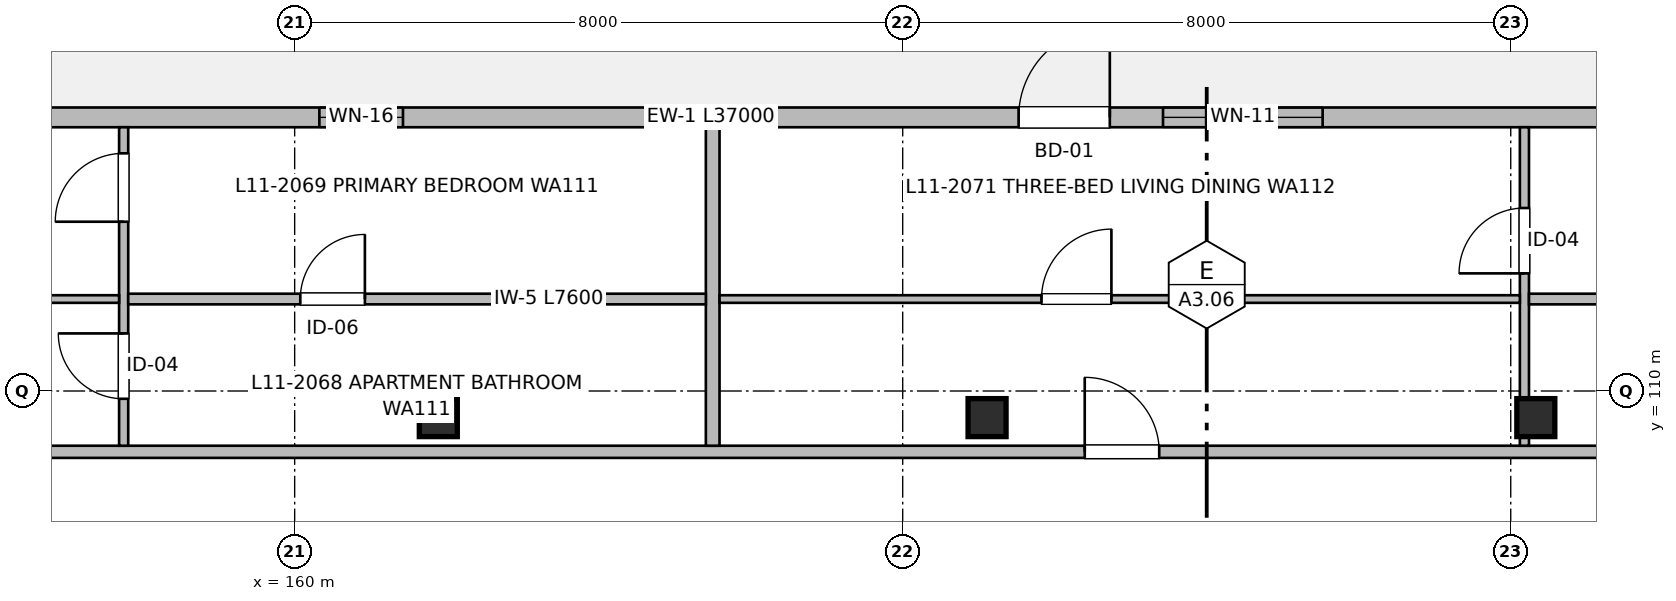
"""IFC4 building model, lengths in metres.
Left out: names, types, materials, properties, quantities, classifications, styles, units other than length and angle.
Written with IfcOpenShell. Run it as: python <this file> out.ifc"""

import sys

from ifc_helpers import new_model, si_unit, direction, frame, frame_2d, origin, origin_2d, place, context, subcontext, project, spatial, rectangle, extrude, element, fill, save


model = new_model("IFC4")
c1 = context("Model", 3, precision=1e-05, world=origin(), true_north=direction((0.0, 1.0)))
c2 = subcontext(c1, "Body", "Model", "MODEL_VIEW")
j1 = project(units=[si_unit("LENGTHUNIT", "METRE"), si_unit("PLANEANGLEUNIT", "RADIAN")], contexts=[c1])
p1 = place(None, origin())
s1 = spatial("IfcSite", under=j1, at=p1, CompositionType="ELEMENT")
p2 = place(p1, origin())
s2 = spatial("IfcBuilding", under=s1, at=p2, CompositionType="ELEMENT")
p3 = place(p2, frame((0.0, 0.0, 36.16)))
s3 = spatial("IfcBuildingStorey", under=s2, at=p3, CompositionType="ELEMENT", Elevation=36.16)
for number, where, z_axis, x_axis in (
    (1, (161.89, 109.65, 0.0), (0.0, 0.0, 1.0), (1.0, 0.0, 0.0)),
    (2, (169.11, 109.65, 0.0), (0.0, 0.0, 1.0), (1.0, 0.0, 0.0)),
    (3, (176.33, 109.65, 0.0), (0.0, 0.0, 1.0), (1.0, 0.0, 0.0)),
):
    element("IfcColumn", number, at=place(p3, frame(where, z_axis=z_axis, x_axis=x_axis)), inside=s3, PredefinedType="COLUMN", context=c2, shape_type="SweptSolid", body=[
        extrude(rectangle(XDim=0.5, YDim=0.5, at=origin_2d()), origin(), (0.0, 0.0, 1.0), 3.2),
    ])
p4 = place(p3, frame((147.0, 113.6, 0.0), z_axis=(0.0, 0.0, 1.0), x_axis=(1.0, 0.0, 0.0)))
e4 = element("IfcWall", 4, at=p4, inside=s3, PredefinedType="SOLIDWALL", context=c2, shape_type="SweptSolid", body=[
    extrude(rectangle(XDim=37.0, YDim=0.26, at=frame_2d((18.5, 0.0))), origin(), (0.0, 0.0, 1.0), 2.98),
])
p5 = place(p4, frame((4.025, 0.0, 0.0)))
e5 = element("IfcOpeningElement", 5, at=p5, cuts=e4, PredefinedType="OPENING", context=c2, shape_type="SweptSolid", body=[
    extrude(rectangle(XDim=1.2, YDim=2.2, at=frame_2d((0.6, 1.1))), frame((0.0, 0.14, 0.0), z_axis=(0.0, -1.0, 0.0), x_axis=(1.0, 0.0, 0.0)), (0.0, 0.0, 1.0), 0.28),
])
p6 = place(p4, frame((5.925, 0.0, 0.87)))
e6 = element("IfcOpeningElement", 6, at=p6, cuts=e4, PredefinedType="OPENING", context=c2, shape_type="SweptSolid", body=[
    extrude(rectangle(XDim=1.25, YDim=1.35, at=frame_2d((0.625, 0.675))), frame((0.0, 0.14, 0.0), z_axis=(0.0, -1.0, 0.0), x_axis=(1.0, 0.0, 0.0)), (0.0, 0.0, 1.0), 0.28),
])
p7 = place(p4, frame((13.325, 0.0, 0.62)))
e7 = element("IfcOpeningElement", 7, at=p7, cuts=e4, PredefinedType="OPENING", context=c2, shape_type="SweptSolid", body=[
    extrude(rectangle(XDim=1.1, YDim=1.6, at=frame_2d((0.55, 0.8))), frame((0.0, 0.14, 0.0), z_axis=(0.0, -1.0, 0.0), x_axis=(1.0, 0.0, 0.0)), (0.0, 0.0, 1.0), 0.28),
])
p8 = place(p4, frame((22.525, 0.0, 0.0)))
e8 = element("IfcOpeningElement", 8, at=p8, cuts=e4, PredefinedType="OPENING", context=c2, shape_type="SweptSolid", body=[
    extrude(rectangle(XDim=1.2, YDim=2.2, at=frame_2d((0.6, 1.1))), frame((0.0, 0.14, 0.0), z_axis=(0.0, -1.0, 0.0), x_axis=(1.0, 0.0, 0.0)), (0.0, 0.0, 1.0), 0.28),
])
p9 = place(p4, frame((24.425, 0.0, 0.67)))
e9 = element("IfcOpeningElement", 9, at=p9, cuts=e4, PredefinedType="OPENING", context=c2, shape_type="SweptSolid", body=[
    extrude(rectangle(XDim=2.1, YDim=1.55, at=frame_2d((1.05, 0.775))), frame((0.0, 0.14, 0.0), z_axis=(0.0, -1.0, 0.0), x_axis=(1.0, 0.0, 0.0)), (0.0, 0.0, 1.0), 0.28),
])
p10 = place(p4, frame((31.525, 0.0, 0.72)))
e10 = element("IfcOpeningElement", 10, at=p10, cuts=e4, PredefinedType="OPENING", context=c2, shape_type="SweptSolid", body=[
    extrude(rectangle(XDim=1.7, YDim=1.5, at=frame_2d((0.85, 0.75))), frame((0.0, 0.14, 0.0), z_axis=(0.0, -1.0, 0.0), x_axis=(1.0, 0.0, 0.0)), (0.0, 0.0, 1.0), 0.28),
])
p11 = place(p3, frame((147.16, 109.2, 0.0), z_axis=(0.0, 0.0, 1.0), x_axis=(1.0, 0.0, 0.0)))
e11 = element("IfcWall", 11, at=p11, inside=s3, PredefinedType="PARTITIONING", context=c2, shape_type="SweptSolid", body=[
    extrude(rectangle(XDim=36.68, YDim=0.16, at=frame_2d((18.34, 0.0))), origin(), (0.0, 0.0, 1.0), 2.935),
])
p12 = place(p11, frame((4.805, 0.0, 0.0)))
e12 = element("IfcOpeningElement", 12, at=p12, cuts=e11, PredefinedType="OPENING", context=c2, shape_type="SweptSolid", body=[
    extrude(rectangle(XDim=0.98, YDim=2.15, at=frame_2d((0.49, 1.075))), frame((0.0, 0.09, 0.0), z_axis=(0.0, -1.0, 0.0), x_axis=(1.0, 0.0, 0.0)), (0.0, 0.0, 1.0), 0.18),
])
p13 = place(p11, frame((23.235, 0.0, 0.0)))
e13 = element("IfcOpeningElement", 13, at=p13, cuts=e11, PredefinedType="OPENING", context=c2, shape_type="SweptSolid", body=[
    extrude(rectangle(XDim=0.98, YDim=2.15, at=frame_2d((0.49, 1.075))), frame((0.0, 0.09, 0.0), z_axis=(0.0, -1.0, 0.0), x_axis=(1.0, 0.0, 0.0)), (0.0, 0.0, 1.0), 0.18),
])
p14 = place(p3, frame((165.5, 109.28, 0.0), z_axis=(0.0, 0.0, 1.0), x_axis=(0.0, 1.0, 0.0)))
e14 = element("IfcWall", 14, at=p14, inside=s3, PredefinedType="PARTITIONING", context=c2, shape_type="SweptSolid", body=[
    extrude(rectangle(XDim=4.19, YDim=0.18, at=frame_2d((2.095, 0.0))), origin(), (0.0, 0.0, 1.0), 2.935),
])
p15 = place(p3, frame((157.75, 109.28, 0.0), z_axis=(0.0, 0.0, 1.0), x_axis=(0.0, 1.0, 0.0)))
e15 = element("IfcWall", 15, at=p15, inside=s3, PredefinedType="PARTITIONING", context=c2, shape_type="SweptSolid", body=[
    extrude(rectangle(XDim=4.19, YDim=0.12, at=frame_2d((2.095, 0.0))), origin(), (0.0, 0.0, 1.0), 2.935),
])
p16 = place(p15, frame((0.618, 0.0, 0.0)))
e16 = element("IfcOpeningElement", 16, at=p16, cuts=e15, PredefinedType="OPENING", context=c2, shape_type="SweptSolid", body=[
    extrude(rectangle(XDim=0.86, YDim=2.1, at=frame_2d((0.43, 1.05))), frame((0.0, 0.07, 0.0), z_axis=(0.0, -1.0, 0.0), x_axis=(1.0, 0.0, 0.0)), (0.0, 0.0, 1.0), 0.14),
])
p17 = place(p15, frame((2.947, 0.0, 0.0)))
e17 = element("IfcOpeningElement", 17, at=p17, cuts=e15, PredefinedType="OPENING", context=c2, shape_type="SweptSolid", body=[
    extrude(rectangle(XDim=0.9, YDim=2.1, at=frame_2d((0.45, 1.05))), frame((0.0, 0.07, 0.0), z_axis=(0.0, -1.0, 0.0), x_axis=(1.0, 0.0, 0.0)), (0.0, 0.0, 1.0), 0.14),
])
p18 = place(p3, frame((157.81, 111.21, 0.0), z_axis=(0.0, 0.0, 1.0), x_axis=(1.0, 0.0, 0.0)))
e18 = element("IfcWall", 18, at=p18, inside=s3, PredefinedType="PARTITIONING", context=c2, shape_type="SweptSolid", body=[
    extrude(rectangle(XDim=7.6, YDim=0.14, at=frame_2d((3.8, 0.0))), origin(), (0.0, 0.0, 1.0), 2.935),
])
p19 = place(p18, frame((2.264, 0.0, 0.0)))
e19 = element("IfcOpeningElement", 19, at=p19, cuts=e18, PredefinedType="OPENING", context=c2, shape_type="SweptSolid", body=[
    extrude(rectangle(XDim=0.85, YDim=2.05, at=frame_2d((0.425, 1.025))), frame((0.0, 0.08, 0.0), z_axis=(0.0, -1.0, 0.0), x_axis=(1.0, 0.0, 0.0)), (0.0, 0.0, 1.0), 0.16),
])
p20 = place(p3, frame((147.16, 111.21, 0.0), z_axis=(0.0, 0.0, 1.0), x_axis=(1.0, 0.0, 0.0)))
e20 = element("IfcWall", 20, at=p20, inside=s3, PredefinedType="PARTITIONING", context=c2, shape_type="SweptSolid", body=[
    extrude(rectangle(XDim=10.53, YDim=0.1, at=frame_2d((5.265, 0.0))), origin(), (0.0, 0.0, 1.0), 2.935),
])
p21 = place(p20, frame((4.236, 0.0, 0.0)))
e21 = element("IfcOpeningElement", 21, at=p21, cuts=e20, PredefinedType="OPENING", context=c2, shape_type="SweptSolid", body=[
    extrude(rectangle(XDim=0.92, YDim=2.1, at=frame_2d((0.46, 1.05))), frame((0.0, 0.06, 0.0), z_axis=(0.0, -1.0, 0.0), x_axis=(1.0, 0.0, 0.0)), (0.0, 0.0, 1.0), 0.12),
])
p22 = place(p3, frame((176.18, 109.28, 0.0), z_axis=(0.0, 0.0, 1.0), x_axis=(0.0, 1.0, 0.0)))
e22 = element("IfcWall", 22, at=p22, inside=s3, PredefinedType="PARTITIONING", context=c2, shape_type="SweptSolid", body=[
    extrude(rectangle(XDim=4.19, YDim=0.12, at=frame_2d((2.095, 0.0))), origin(), (0.0, 0.0, 1.0), 2.935),
])
p23 = place(p22, frame((2.268, 0.0, 0.0)))
e23 = element("IfcOpeningElement", 23, at=p23, cuts=e22, PredefinedType="OPENING", context=c2, shape_type="SweptSolid", body=[
    extrude(rectangle(XDim=0.86, YDim=2.1, at=frame_2d((0.43, 1.05))), frame((0.0, 0.07, 0.0), z_axis=(0.0, -1.0, 0.0), x_axis=(1.0, 0.0, 0.0)), (0.0, 0.0, 1.0), 0.14),
])
p24 = place(p3, frame((176.24, 111.21, 0.0), z_axis=(0.0, 0.0, 1.0), x_axis=(1.0, 0.0, 0.0)))
e24 = element("IfcWall", 24, at=p24, inside=s3, PredefinedType="PARTITIONING", context=c2, shape_type="SweptSolid", body=[
    extrude(rectangle(XDim=7.6, YDim=0.14, at=frame_2d((3.8, 0.0))), origin(), (0.0, 0.0, 1.0), 2.935),
])
p25 = place(p24, frame((3.064, 0.0, 0.0)))
e25 = element("IfcOpeningElement", 25, at=p25, cuts=e24, PredefinedType="OPENING", context=c2, shape_type="SweptSolid", body=[
    extrude(rectangle(XDim=0.85, YDim=2.05, at=frame_2d((0.425, 1.025))), frame((0.0, 0.08, 0.0), z_axis=(0.0, -1.0, 0.0), x_axis=(1.0, 0.0, 0.0)), (0.0, 0.0, 1.0), 0.16),
])
p26 = place(p3, frame((165.59, 111.21, 0.0), z_axis=(0.0, 0.0, 1.0), x_axis=(1.0, 0.0, 0.0)))
e26 = element("IfcWall", 26, at=p26, inside=s3, PredefinedType="PARTITIONING", context=c2, shape_type="SweptSolid", body=[
    extrude(rectangle(XDim=10.53, YDim=0.1, at=frame_2d((5.265, 0.0))), origin(), (0.0, 0.0, 1.0), 2.935),
])
p27 = place(p26, frame((4.236, 0.0, 0.0)))
e27 = element("IfcOpeningElement", 27, at=p27, cuts=e26, PredefinedType="OPENING", context=c2, shape_type="SweptSolid", body=[
    extrude(rectangle(XDim=0.92, YDim=2.1, at=frame_2d((0.46, 1.05))), frame((0.0, 0.06, 0.0), z_axis=(0.0, -1.0, 0.0), x_axis=(1.0, 0.0, 0.0)), (0.0, 0.0, 1.0), 0.12),
])
p28 = place(p7, origin())
e28 = element("IfcWindow", 28, at=p28, inside=s3, PartitioningType="SINGLE_PANEL", PredefinedType="WINDOW", context=c2, shape_type="SweptSolid", body=[
    extrude(rectangle(XDim=1.1, YDim=1.6, at=frame_2d((0.55, 0.8))), frame((0.0, 0.03, 0.0), z_axis=(0.0, -1.0, 0.0), x_axis=(1.0, 0.0, 0.0)), (0.0, 0.0, 1.0), 0.06),
])
fill(e7, e28)
p29 = place(p8, origin())
e29 = element("IfcDoor", 29, at=p29, inside=s3, OperationType="SINGLE_SWING_RIGHT", PredefinedType="DOOR", context=c2, shape_type="SweptSolid", body=[
    extrude(rectangle(XDim=1.2, YDim=2.2, at=frame_2d((0.6, 1.1))), frame((0.0, 0.025, 0.0), z_axis=(0.0, -1.0, 0.0), x_axis=(1.0, 0.0, 0.0)), (0.0, 0.0, 1.0), 0.05),
])
fill(e8, e29)
p30 = place(p9, origin())
e30 = element("IfcWindow", 30, at=p30, inside=s3, PartitioningType="SINGLE_PANEL", PredefinedType="WINDOW", context=c2, shape_type="SweptSolid", body=[
    extrude(rectangle(XDim=2.1, YDim=1.55, at=frame_2d((1.05, 0.775))), frame((0.0, 0.03, 0.0), z_axis=(0.0, -1.0, 0.0), x_axis=(1.0, 0.0, 0.0)), (0.0, 0.0, 1.0), 0.06),
])
fill(e9, e30)
p31 = place(p16, origin())
e31 = element("IfcDoor", 31, at=p31, inside=s3, OperationType="SINGLE_SWING_RIGHT", PredefinedType="DOOR", context=c2, shape_type="SweptSolid", body=[
    extrude(rectangle(XDim=0.86, YDim=2.1, at=frame_2d((0.43, 1.05))), frame((0.0, 0.025, 0.0), z_axis=(0.0, -1.0, 0.0), x_axis=(1.0, 0.0, 0.0)), (0.0, 0.0, 1.0), 0.05),
])
fill(e16, e31)
p32 = place(p17, origin())
e32 = element("IfcDoor", 32, at=p32, inside=s3, OperationType="SINGLE_SWING_LEFT", PredefinedType="DOOR", context=c2, shape_type="SweptSolid", body=[
    extrude(rectangle(XDim=0.9, YDim=2.1, at=frame_2d((0.45, 1.05))), frame((0.0, 0.025, 0.0), z_axis=(0.0, -1.0, 0.0), x_axis=(1.0, 0.0, 0.0)), (0.0, 0.0, 1.0), 0.05),
])
fill(e17, e32)
p33 = place(p19, origin())
e33 = element("IfcDoor", 33, at=p33, inside=s3, OperationType="SINGLE_SWING_RIGHT", PredefinedType="DOOR", context=c2, shape_type="SweptSolid", body=[
    extrude(rectangle(XDim=0.85, YDim=2.05, at=frame_2d((0.425, 1.025))), frame((0.0, 0.025, 0.0), z_axis=(0.0, -1.0, 0.0), x_axis=(1.0, 0.0, 0.0)), (0.0, 0.0, 1.0), 0.05),
])
fill(e19, e33)
p34 = place(p13, origin())
e34 = element("IfcDoor", 34, at=p34, inside=s3, OperationType="SINGLE_SWING_LEFT", PredefinedType="DOOR", context=c2, shape_type="SweptSolid", body=[
    extrude(rectangle(XDim=0.98, YDim=2.15, at=frame_2d((0.49, 1.075))), frame((0.0, 0.025, 0.0), z_axis=(0.0, -1.0, 0.0), x_axis=(1.0, 0.0, 0.0)), (0.0, 0.0, 1.0), 0.05),
])
fill(e13, e34)
p35 = place(p27, origin())
e35 = element("IfcDoor", 35, at=p35, inside=s3, OperationType="SINGLE_SWING_RIGHT", PredefinedType="DOOR", context=c2, shape_type="SweptSolid", body=[
    extrude(rectangle(XDim=0.92, YDim=2.1, at=frame_2d((0.46, 1.05))), frame((0.0, 0.025, 0.0), z_axis=(0.0, -1.0, 0.0), x_axis=(1.0, 0.0, 0.0)), (0.0, 0.0, 1.0), 0.05),
])
fill(e27, e35)
p36 = place(p23, origin())
e36 = element("IfcDoor", 36, at=p36, inside=s3, OperationType="SINGLE_SWING_LEFT", PredefinedType="DOOR", context=c2, shape_type="SweptSolid", body=[
    extrude(rectangle(XDim=0.86, YDim=2.1, at=frame_2d((0.43, 1.05))), frame((0.0, 0.025, 0.0), z_axis=(0.0, -1.0, 0.0), x_axis=(1.0, 0.0, 0.0)), (0.0, 0.0, 1.0), 0.05),
])
fill(e23, e36)
save(model, sys.argv[1])
